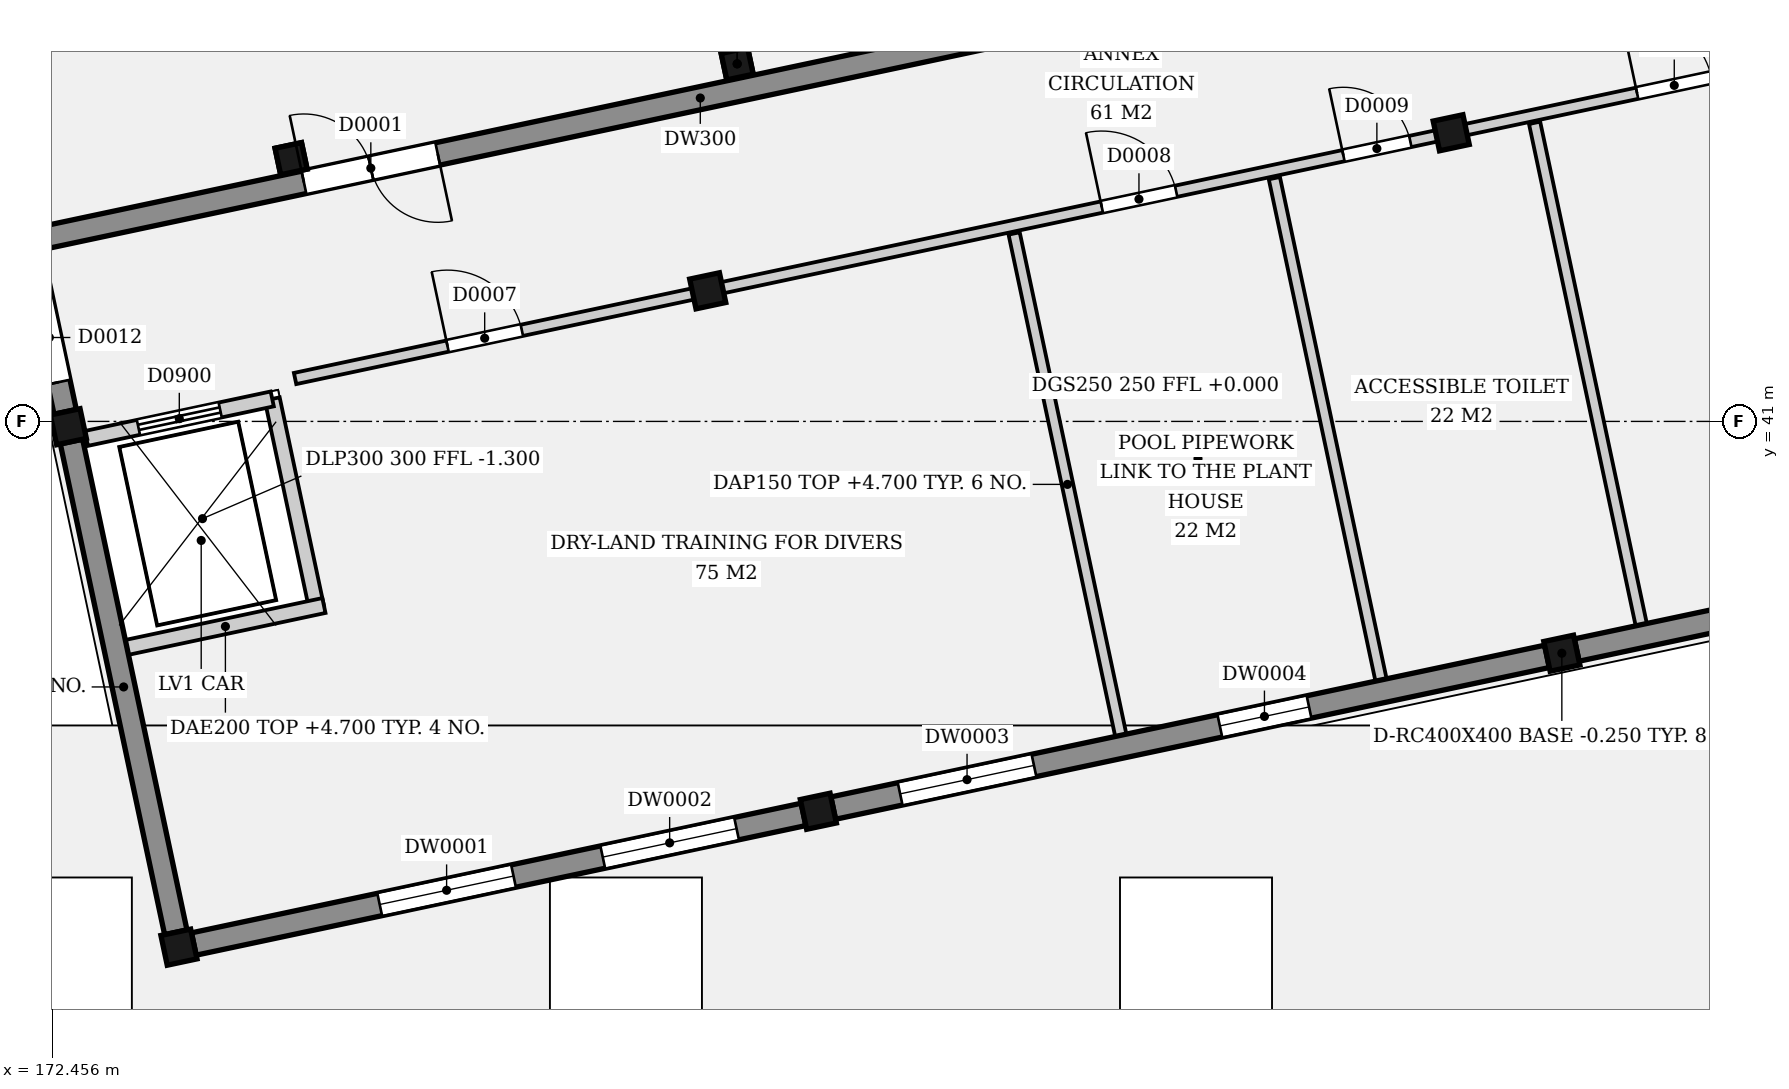
"""IFC4 building model, lengths in metres.
Left out: names, types, materials, properties, quantities, classifications, styles, units other than length and angle.
Written with IfcOpenShell. Run it as: python <this file> out.ifc"""

import sys

from ifc_helpers import new_model, si_unit, direction, frame, frame_2d, origin, origin_2d, place, context, subcontext, project, spatial, rectangle, hollow_rectangle, extrude, element, fill, save


model = new_model("IFC4")
c1 = context("Model", 3, precision=1e-05, world=origin(), true_north=direction((0.0, 1.0)))
c2 = subcontext(c1, "Body", "Model", "MODEL_VIEW")
j1 = project(units=[si_unit("LENGTHUNIT", "METRE"), si_unit("PLANEANGLEUNIT", "RADIAN")], contexts=[c1])
p1 = place(None, origin())
s1 = spatial("IfcSite", under=j1, at=p1, CompositionType="ELEMENT")
p2 = place(p1, origin())
s2 = spatial("IfcBuilding", under=s1, at=p2, CompositionType="ELEMENT")
p3 = place(p2, origin())
s3 = spatial("IfcBuildingStorey", under=s2, at=p3, CompositionType="ELEMENT", Elevation=0.0)
for number, where, z_axis, x_axis in (
    (1, (174.119, 34.083, -0.25), (0.0, 0.0, 1.0), (0.978, 0.208, 0.0)),
    (2, (172.664, 40.93, -0.25), (0.0, 0.0, 1.0), (0.978, 0.208, 0.0)),
    (3, (182.531, 35.871, -0.25), (0.0, 0.0, 1.0), (0.978, 0.208, 0.0)),
    (4, (181.076, 42.718, -0.25), (0.0, 0.0, 1.0), (0.978, 0.208, 0.0)),
    (5, (192.313, 37.95, -0.25), (0.0, 0.0, 1.0), (0.978, 0.208, 0.0)),
    (6, (190.858, 44.797, -0.25), (0.0, 0.0, 1.0), (0.978, 0.208, 0.0)),
):
    element("IfcColumn", number, at=place(p3, frame(where, z_axis=z_axis, x_axis=x_axis)), inside=s3, PredefinedType="COLUMN", context=c2, shape_type="SweptSolid", body=[
        extrude(rectangle(XDim=0.4, YDim=0.4, at=origin_2d()), origin(), (0.0, 0.0, 1.0), 5.25),
    ])
p4 = place(p3, frame((175.595, 44.457, -0.25), z_axis=(0.0, 0.0, 1.0), x_axis=(0.978147600734, 0.207911690818, 0.0)))
e7 = element("IfcColumn", 7, at=p4, inside=s3, PredefinedType="COLUMN", context=c2, shape_type="SweptSolid", body=[
    extrude(hollow_rectangle(XDim=0.356, YDim=0.356, WallThickness=0.016, InnerFilletRadius=0.008, OuterFilletRadius=0.024, at=origin_2d()), origin(), (0.0, 0.0, 1.0), 0.25),
])
p5 = place(p3, frame((175.595, 44.457, 0.0), z_axis=(0.0, 0.0, 1.0), x_axis=(0.978147600734, 0.207911690818, 0.0)))
e8 = element("IfcColumn", 8, at=p5, inside=s3, PredefinedType="COLUMN", context=c2, shape_type="SweptSolid", body=[
    extrude(hollow_rectangle(XDim=0.356, YDim=0.356, WallThickness=0.016, InnerFilletRadius=0.008, OuterFilletRadius=0.024, at=origin_2d()), origin(), (0.0, 0.0, 1.0), 5.0),
])
p6 = place(p3, frame((181.464, 45.704, -0.25), z_axis=(0.0, 0.0, 1.0), x_axis=(0.978147600734, 0.207911690818, 0.0)))
e9 = element("IfcColumn", 9, at=p6, inside=s3, PredefinedType="COLUMN", context=c2, shape_type="SweptSolid", body=[
    extrude(hollow_rectangle(XDim=0.356, YDim=0.356, WallThickness=0.016, InnerFilletRadius=0.008, OuterFilletRadius=0.024, at=origin_2d()), origin(), (0.0, 0.0, 1.0), 0.25),
])
p7 = place(p3, frame((181.464, 45.704, 0.0), z_axis=(0.0, 0.0, 1.0), x_axis=(0.978147600734, 0.207911690818, 0.0)))
e10 = element("IfcColumn", 10, at=p7, inside=s3, PredefinedType="COLUMN", context=c2, shape_type="SweptSolid", body=[
    extrude(hollow_rectangle(XDim=0.356, YDim=0.356, WallThickness=0.016, InnerFilletRadius=0.008, OuterFilletRadius=0.024, at=origin_2d()), origin(), (0.0, 0.0, 1.0), 5.0),
])
p8 = place(p3, frame((163.439, 41.525, 0.0), z_axis=(0.0, 0.0, 1.0), x_axis=(0.978148061555, 0.207909522815, 0.0)))
e11 = element("IfcWall", 11, at=p8, inside=s3, PredefinedType="SOLIDWALL", context=c2, shape_type="SweptSolid", body=[
    extrude(rectangle(XDim=37.5, YDim=0.3, at=frame_2d((18.75, 0.0))), origin(), (0.0, 0.0, 1.0), 5.0),
])
p9 = place(p8, frame((12.6, 0.0, 0.0)))
e12 = element("IfcOpeningElement", 12, at=p9, cuts=e11, PredefinedType="OPENING", context=c2, shape_type="SweptSolid", body=[
    extrude(rectangle(XDim=1.8, YDim=2.4, at=frame_2d((0.9, 1.2))), frame((0.0, 0.16, 0.0), z_axis=(0.0, -1.0, 0.0), x_axis=(1.0, 0.0, 0.0)), (0.0, 0.0, 1.0), 0.32),
])
p10 = place(p8, frame((27.6, 0.0, 0.0)))
e13 = element("IfcOpeningElement", 13, at=p10, cuts=e11, PredefinedType="OPENING", context=c2, shape_type="SweptSolid", body=[
    extrude(rectangle(XDim=1.8, YDim=2.4, at=frame_2d((0.9, 1.2))), frame((0.0, 0.16, 0.0), z_axis=(0.0, -1.0, 0.0), x_axis=(1.0, 0.0, 0.0)), (0.0, 0.0, 1.0), 0.32),
])
p11 = place(p3, frame((174.315, 34.125, 0.0), z_axis=(0.0, 0.0, 1.0), x_axis=(0.978148331689, 0.207908251916, 0.0)))
e14 = element("IfcWall", 14, at=p11, inside=s3, PredefinedType="ELEMENTEDWALL", context=c2, shape_type="SweptSolid", body=[
    extrude(rectangle(XDim=8.2, YDim=0.3, at=frame_2d((4.1, 0.0))), origin(), (0.0, 0.0, 1.0), 4.7),
])
p12 = place(p11, frame((2.5, 0.0, 1.0)))
e15 = element("IfcOpeningElement", 15, at=p12, cuts=e14, PredefinedType="OPENING", context=c2, shape_type="SweptSolid", body=[
    extrude(rectangle(XDim=1.8, YDim=1.2, at=frame_2d((0.9, 0.6))), frame((0.0, 0.16, 0.0), z_axis=(0.0, -1.0, 0.0), x_axis=(1.0, 0.0, 0.0)), (0.0, 0.0, 1.0), 0.32),
])
p13 = place(p11, frame((5.5, 0.0, 1.0)))
e16 = element("IfcOpeningElement", 16, at=p13, cuts=e14, PredefinedType="OPENING", context=c2, shape_type="SweptSolid", body=[
    extrude(rectangle(XDim=1.8, YDim=1.2, at=frame_2d((0.9, 0.6))), frame((0.0, 0.16, 0.0), z_axis=(0.0, -1.0, 0.0), x_axis=(1.0, 0.0, 0.0)), (0.0, 0.0, 1.0), 0.32),
])
p14 = place(p3, frame((182.727, 35.913, 0.0), z_axis=(0.0, 0.0, 1.0), x_axis=(0.978150512552, 0.207897991319, 0.0)))
e17 = element("IfcWall", 17, at=p14, inside=s3, PredefinedType="ELEMENTEDWALL", context=c2, shape_type="SweptSolid", body=[
    extrude(rectangle(XDim=9.6, YDim=0.3, at=frame_2d((4.8, 0.0))), origin(), (0.0, 0.0, 1.0), 4.7),
])
p15 = place(p14, frame((0.9, 0.0, 1.0)))
e18 = element("IfcOpeningElement", 18, at=p15, cuts=e17, PredefinedType="OPENING", context=c2, shape_type="SweptSolid", body=[
    extrude(rectangle(XDim=1.8, YDim=1.2, at=frame_2d((0.9, 0.6))), frame((0.0, 0.16, 0.0), z_axis=(0.0, -1.0, 0.0), x_axis=(1.0, 0.0, 0.0)), (0.0, 0.0, 1.0), 0.32),
])
p16 = place(p14, frame((5.2, 0.0, 1.4)))
e19 = element("IfcOpeningElement", 19, at=p16, cuts=e17, PredefinedType="OPENING", context=c2, shape_type="SweptSolid", body=[
    extrude(rectangle(XDim=1.2, YDim=1.2, at=frame_2d((0.6, 0.6))), frame((0.0, 0.16, 0.0), z_axis=(0.0, -1.0, 0.0), x_axis=(1.0, 0.0, 0.0)), (0.0, 0.0, 1.0), 0.32),
])
p17 = place(p3, frame((192.509, 37.992, 0.0), z_axis=(0.0, 0.0, 1.0), x_axis=(0.978146709523, 0.20791588359, 0.0)))
e20 = element("IfcWall", 20, at=p17, inside=s3, PredefinedType="ELEMENTEDWALL", context=c2, shape_type="SweptSolid", body=[
    extrude(rectangle(XDim=9.2, YDim=0.3, at=frame_2d((4.6, 0.0))), origin(), (0.0, 0.0, 1.0), 4.7),
])
p18 = place(p17, frame((2.4, 0.0, 1.0)))
e21 = element("IfcOpeningElement", 21, at=p18, cuts=e20, PredefinedType="OPENING", context=c2, shape_type="SweptSolid", body=[
    extrude(rectangle(XDim=1.8, YDim=1.2, at=frame_2d((0.9, 0.6))), frame((0.0, 0.16, 0.0), z_axis=(0.0, -1.0, 0.0), x_axis=(1.0, 0.0, 0.0)), (0.0, 0.0, 1.0), 0.32),
])
p19 = place(p3, frame((174.078, 34.279, 0.0), z_axis=(0.0, 0.0, 1.0), x_axis=(-0.207924673876, 0.978144841009, 0.0)))
e22 = element("IfcWall", 22, at=p19, inside=s3, PredefinedType="ELEMENTEDWALL", context=c2, shape_type="SweptSolid", body=[
    extrude(rectangle(XDim=6.6, YDim=0.3, at=frame_2d((3.3, 0.0))), origin(), (0.0, 0.0, 1.0), 4.7),
])
p20 = place(p3, frame((172.623, 41.126, 0.0), z_axis=(0.0, 0.0, 1.0), x_axis=(-0.207915795165, 0.978146728319, 0.0)))
e23 = element("IfcWall", 23, at=p20, inside=s3, PredefinedType="ELEMENTEDWALL", context=c2, shape_type="SweptSolid", body=[
    extrude(rectangle(XDim=2.15, YDim=0.3, at=frame_2d((1.075, 0.0))), origin(), (0.0, 0.0, 1.0), 4.7),
])
p21 = place(p20, frame((0.4, 0.0, 0.0)))
e24 = element("IfcOpeningElement", 24, at=p21, cuts=e23, PredefinedType="OPENING", context=c2, shape_type="SweptSolid", body=[
    extrude(rectangle(XDim=1.2, YDim=2.1, at=frame_2d((0.6, 1.05))), frame((0.0, 0.16, 0.0), z_axis=(0.0, -1.0, 0.0), x_axis=(1.0, 0.0, 0.0)), (0.0, 0.0, 1.0), 0.32),
])
p22 = place(p3, frame((175.647, 41.564, 0.0), z_axis=(0.0, 0.0, 1.0), x_axis=(0.978148991832, 0.207905146106, 0.0)))
e25 = element("IfcWall", 25, at=p22, inside=s3, PredefinedType="PARTITIONING", context=c2, shape_type="SweptSolid", body=[
    extrude(rectangle(XDim=5.35, YDim=0.15, at=frame_2d((2.675, 0.0))), origin(), (0.0, 0.0, 1.0), 4.7),
])
p23 = place(p22, frame((2.05, 0.0, 0.0)))
e26 = element("IfcOpeningElement", 26, at=p23, cuts=e25, PredefinedType="OPENING", context=c2, shape_type="SweptSolid", body=[
    extrude(rectangle(XDim=1.0, YDim=2.1, at=frame_2d((0.5, 1.05))), frame((0.0, 0.085, 0.0), z_axis=(0.0, -1.0, 0.0), x_axis=(1.0, 0.0, 0.0)), (0.0, 0.0, 1.0), 0.17),
])
p24 = place(p3, frame((181.272, 42.76, 0.0), z_axis=(0.0, 0.0, 1.0), x_axis=(0.978150512552, 0.207897991319, 0.0)))
e27 = element("IfcWall", 27, at=p24, inside=s3, PredefinedType="PARTITIONING", context=c2, shape_type="SweptSolid", body=[
    extrude(rectangle(XDim=9.6, YDim=0.15, at=frame_2d((4.8, 0.0))), origin(), (0.0, 0.0, 1.0), 4.7),
])
p25 = place(p24, frame((5.1, 0.0, 0.0)))
e28 = element("IfcOpeningElement", 28, at=p25, cuts=e27, PredefinedType="OPENING", context=c2, shape_type="SweptSolid", body=[
    extrude(rectangle(XDim=1.0, YDim=2.1, at=frame_2d((0.5, 1.05))), frame((0.0, 0.085, 0.0), z_axis=(0.0, -1.0, 0.0), x_axis=(1.0, 0.0, 0.0)), (0.0, 0.0, 1.0), 0.17),
])
p26 = place(p24, frame((8.35, 0.0, 0.0)))
e29 = element("IfcOpeningElement", 29, at=p26, cuts=e27, PredefinedType="OPENING", context=c2, shape_type="SweptSolid", body=[
    extrude(rectangle(XDim=0.9, YDim=2.1, at=frame_2d((0.45, 1.05))), frame((0.0, 0.085, 0.0), z_axis=(0.0, -1.0, 0.0), x_axis=(1.0, 0.0, 0.0)), (0.0, 0.0, 1.0), 0.17),
])
p27 = place(p3, frame((191.053, 44.839, 0.0), z_axis=(0.0, 0.0, 1.0), x_axis=(0.978146709523, 0.20791588359, 0.0)))
e30 = element("IfcWall", 30, at=p27, inside=s3, PredefinedType="PARTITIONING", context=c2, shape_type="SweptSolid", body=[
    extrude(rectangle(XDim=9.2, YDim=0.15, at=frame_2d((4.6, 0.0))), origin(), (0.0, 0.0, 1.0), 4.7),
])
p28 = place(p27, frame((2.3, 0.0, 0.0)))
e31 = element("IfcOpeningElement", 31, at=p28, cuts=e30, PredefinedType="OPENING", context=c2, shape_type="SweptSolid", body=[
    extrude(rectangle(XDim=1.0, YDim=2.1, at=frame_2d((0.5, 1.05))), frame((0.0, 0.085, 0.0), z_axis=(0.0, -1.0, 0.0), x_axis=(1.0, 0.0, 0.0)), (0.0, 0.0, 1.0), 0.17),
])
p29 = place(p27, frame((7.25, 0.0, 0.0)))
e32 = element("IfcOpeningElement", 32, at=p29, cuts=e30, PredefinedType="OPENING", context=c2, shape_type="SweptSolid", body=[
    extrude(rectangle(XDim=1.1, YDim=2.1, at=frame_2d((0.55, 1.05))), frame((0.0, 0.085, 0.0), z_axis=(0.0, -1.0, 0.0), x_axis=(1.0, 0.0, 0.0)), (0.0, 0.0, 1.0), 0.17),
])
for number, where, z_axis, x_axis in (
    (33, (186.511, 36.87, 0.0), (0.0, 0.0, 1.0), (-0.208, 0.978, 0.0)),
    (34, (189.934, 37.598, 0.0), (0.0, 0.0, 1.0), (-0.208, 0.978, 0.0)),
    (35, (193.358, 38.326, 0.0), (0.0, 0.0, 1.0), (-0.208, 0.978, 0.0)),
):
    element("IfcWall", number, at=place(p3, frame(where, z_axis=z_axis, x_axis=x_axis)), inside=s3, PredefinedType="PARTITIONING", context=c2, shape_type="SweptSolid", body=[
        extrude(rectangle(XDim=6.75, YDim=0.15, at=frame_2d((3.375, 0.0))), origin(), (0.0, 0.0, 1.0), 4.7),
    ])
p30 = place(p3, frame((172.901, 40.776, 0.0), z_axis=(0.0, 0.0, 1.0), x_axis=(0.978146935828, 0.207914818928, 0.0)))
e36 = element("IfcWall", 36, at=p30, inside=s3, PredefinedType="SOLIDWALL", context=c2, shape_type="SweptSolid", body=[
    extrude(rectangle(XDim=2.5, YDim=0.2, at=frame_2d((1.25, 0.0))), origin(), (0.0, 0.0, 1.0), 4.7),
])
p31 = place(p30, frame((0.7, 0.0, 0.0)))
e37 = element("IfcOpeningElement", 37, at=p31, cuts=e36, PredefinedType="OPENING", context=c2, shape_type="SweptSolid", body=[
    extrude(rectangle(XDim=1.1, YDim=2.1, at=frame_2d((0.55, 1.05))), frame((0.0, 0.11, 0.0), z_axis=(0.0, -1.0, 0.0), x_axis=(1.0, 0.0, 0.0)), (0.0, 0.0, 1.0), 0.22),
])
p32 = place(p3, frame((175.929, 38.557, 0.0), z_axis=(0.0, 0.0, 1.0), x_axis=(-0.207873355681, 0.978155748334, 0.0)))
e38 = element("IfcWall", 38, at=p32, inside=s3, PredefinedType="SOLIDWALL", context=c2, shape_type="SweptSolid", body=[
    extrude(rectangle(XDim=2.8, YDim=0.2, at=frame_2d((1.4, 0.0))), origin(), (0.0, 0.0, 1.0), 4.7),
])
p33 = place(p3, frame((173.435, 38.027, 0.0), z_axis=(0.0, 0.0, 1.0), x_axis=(0.978142223379, 0.207936987677, 0.0)))
e39 = element("IfcWall", 39, at=p33, inside=s3, PredefinedType="SOLIDWALL", context=c2, shape_type="SweptSolid", body=[
    extrude(rectangle(XDim=2.65, YDim=0.2, at=frame_2d((1.325, 0.0))), origin(), (0.0, 0.0, 1.0), 4.7),
])
p34 = place(p9, origin())
e40 = element("IfcDoor", 40, at=p34, inside=s3, OperationType="DOUBLE_DOOR_SINGLE_SWING", PredefinedType="DOOR", context=c2, shape_type="SweptSolid", body=[
    extrude(rectangle(XDim=1.8, YDim=2.4, at=frame_2d((0.9, 1.2))), frame((0.0, 0.025, 0.0), z_axis=(0.0, -1.0, 0.0), x_axis=(1.0, 0.0, 0.0)), (0.0, 0.0, 1.0), 0.05),
])
fill(e12, e40)
p35 = place(p31, origin())
e41 = element("IfcDoor", 41, at=p35, inside=s3, OperationType="SLIDING_TO_LEFT", PredefinedType="DOOR", context=c2, shape_type="SweptSolid", body=[
    extrude(rectangle(XDim=1.1, YDim=2.1, at=frame_2d((0.55, 1.05))), frame((0.0, 0.025, 0.0), z_axis=(0.0, -1.0, 0.0), x_axis=(1.0, 0.0, 0.0)), (0.0, 0.0, 1.0), 0.05),
])
fill(e37, e41)
p36 = place(p23, origin())
e42 = element("IfcDoor", 42, at=p36, inside=s3, OperationType="SINGLE_SWING_LEFT", PredefinedType="DOOR", context=c2, shape_type="SweptSolid", body=[
    extrude(rectangle(XDim=1.0, YDim=2.1, at=frame_2d((0.5, 1.05))), frame((0.0, 0.025, 0.0), z_axis=(0.0, -1.0, 0.0), x_axis=(1.0, 0.0, 0.0)), (0.0, 0.0, 1.0), 0.05),
])
fill(e26, e42)
p37 = place(p25, origin())
e43 = element("IfcDoor", 43, at=p37, inside=s3, OperationType="SINGLE_SWING_LEFT", PredefinedType="DOOR", context=c2, shape_type="SweptSolid", body=[
    extrude(rectangle(XDim=1.0, YDim=2.1, at=frame_2d((0.5, 1.05))), frame((0.0, 0.025, 0.0), z_axis=(0.0, -1.0, 0.0), x_axis=(1.0, 0.0, 0.0)), (0.0, 0.0, 1.0), 0.05),
])
fill(e28, e43)
p38 = place(p26, origin())
e44 = element("IfcDoor", 44, at=p38, inside=s3, OperationType="SINGLE_SWING_LEFT", PredefinedType="DOOR", context=c2, shape_type="SweptSolid", body=[
    extrude(rectangle(XDim=0.9, YDim=2.1, at=frame_2d((0.45, 1.05))), frame((0.0, 0.025, 0.0), z_axis=(0.0, -1.0, 0.0), x_axis=(1.0, 0.0, 0.0)), (0.0, 0.0, 1.0), 0.05),
])
fill(e29, e44)
p39 = place(p28, origin())
e45 = element("IfcDoor", 45, at=p39, inside=s3, OperationType="SINGLE_SWING_LEFT", PredefinedType="DOOR", context=c2, shape_type="SweptSolid", body=[
    extrude(rectangle(XDim=1.0, YDim=2.1, at=frame_2d((0.5, 1.05))), frame((0.0, 0.025, 0.0), z_axis=(0.0, -1.0, 0.0), x_axis=(1.0, 0.0, 0.0)), (0.0, 0.0, 1.0), 0.05),
])
fill(e31, e45)
p40 = place(p21, origin())
e46 = element("IfcDoor", 46, at=p40, inside=s3, OperationType="SINGLE_SWING_LEFT", PredefinedType="DOOR", context=c2, shape_type="SweptSolid", body=[
    extrude(rectangle(XDim=1.2, YDim=2.1, at=frame_2d((0.6, 1.05))), frame((0.0, 0.025, 0.0), z_axis=(0.0, -1.0, 0.0), x_axis=(1.0, 0.0, 0.0)), (0.0, 0.0, 1.0), 0.05),
])
fill(e24, e46)
p41 = place(p12, origin())
e47 = element("IfcWindow", 47, at=p41, inside=s3, PartitioningType="SINGLE_PANEL", PredefinedType="WINDOW", context=c2, shape_type="SweptSolid", body=[
    extrude(rectangle(XDim=1.8, YDim=1.2, at=frame_2d((0.9, 0.6))), frame((0.0, 0.03, 0.0), z_axis=(0.0, -1.0, 0.0), x_axis=(1.0, 0.0, 0.0)), (0.0, 0.0, 1.0), 0.06),
])
fill(e15, e47)
p42 = place(p13, origin())
e48 = element("IfcWindow", 48, at=p42, inside=s3, PartitioningType="SINGLE_PANEL", PredefinedType="WINDOW", context=c2, shape_type="SweptSolid", body=[
    extrude(rectangle(XDim=1.8, YDim=1.2, at=frame_2d((0.9, 0.6))), frame((0.0, 0.03, 0.0), z_axis=(0.0, -1.0, 0.0), x_axis=(1.0, 0.0, 0.0)), (0.0, 0.0, 1.0), 0.06),
])
fill(e16, e48)
p43 = place(p15, origin())
e49 = element("IfcWindow", 49, at=p43, inside=s3, PartitioningType="SINGLE_PANEL", PredefinedType="WINDOW", context=c2, shape_type="SweptSolid", body=[
    extrude(rectangle(XDim=1.8, YDim=1.2, at=frame_2d((0.9, 0.6))), frame((0.0, 0.03, 0.0), z_axis=(0.0, -1.0, 0.0), x_axis=(1.0, 0.0, 0.0)), (0.0, 0.0, 1.0), 0.06),
])
fill(e18, e49)
p44 = place(p16, origin())
e50 = element("IfcWindow", 50, at=p44, inside=s3, PartitioningType="SINGLE_PANEL", PredefinedType="WINDOW", context=c2, shape_type="SweptSolid", body=[
    extrude(rectangle(XDim=1.2, YDim=1.2, at=frame_2d((0.6, 0.6))), frame((0.0, 0.03, 0.0), z_axis=(0.0, -1.0, 0.0), x_axis=(1.0, 0.0, 0.0)), (0.0, 0.0, 1.0), 0.06),
])
fill(e19, e50)
save(model, sys.argv[1])
